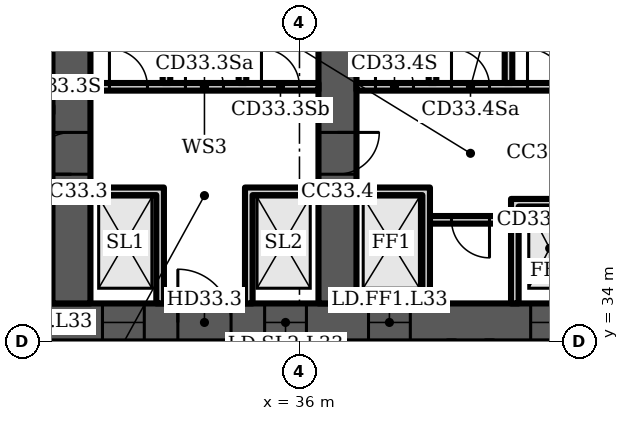
"""IFC4 building model, lengths in metres.
Left out: names, types, materials, properties, quantities, classifications, styles, units other than length and angle.
Written with IfcOpenShell. Run it as: python <this file> out.ifc"""

import sys

from ifc_helpers import new_model, si_unit, direction, frame, frame_2d, origin, place, context, subcontext, project, spatial, polyline, rectangle, outline, extrude, element, fill, save


model = new_model("IFC4")
c1 = context("Model", 3, precision=1e-05, world=origin(), true_north=direction((0.0, 1.0)))
c2 = subcontext(c1, "Body", "Model", "MODEL_VIEW")
j1 = project(units=[si_unit("LENGTHUNIT", "METRE"), si_unit("PLANEANGLEUNIT", "RADIAN")], contexts=[c1])
p1 = place(None, origin())
s1 = spatial("IfcSite", under=j1, at=p1, CompositionType="ELEMENT")
p2 = place(p1, origin())
s2 = spatial("IfcBuilding", under=s1, at=p2, CompositionType="ELEMENT")
p3 = place(p2, frame((0.0, 0.0, 139.9)))
s3 = spatial("IfcBuildingStorey", under=s2, at=p3, CompositionType="ELEMENT", Elevation=139.9)
p4 = place(p3, frame((16.0, 34.5, 0.0), z_axis=(0.0, 0.0, 1.0), x_axis=(1.0, 0.0, 0.0)))
e1 = element("IfcWall", 1, at=p4, inside=s3, PredefinedType="SHEAR", context=c2, shape_type="SweptSolid", body=[
    extrude(rectangle(XDim=49.0, YDim=1.0, at=frame_2d((24.5, 0.0))), origin(), (0.0, 0.0, 1.0), 3.6),
])
p5 = place(p4, frame((1.2, 0.0, 0.0)))
e2 = element("IfcOpeningElement", 2, at=p5, cuts=e1, PredefinedType="OPENING", context=c2, shape_type="SweptSolid", body=[
    extrude(rectangle(XDim=1.1, YDim=2.1, at=frame_2d((0.55, 1.05))), frame((0.0, 0.51, 0.0), z_axis=(0.0, -1.0, 0.0), x_axis=(1.0, 0.0, 0.0)), (0.0, 0.0, 1.0), 1.02),
])
p6 = place(p4, frame((5.083, 0.0, 0.0)))
e3 = element("IfcOpeningElement", 3, at=p6, cuts=e1, PredefinedType="OPENING", context=c2, shape_type="SweptSolid", body=[
    extrude(rectangle(XDim=1.1, YDim=2.1, at=frame_2d((0.55, 1.05))), frame((0.0, 0.51, 0.0), z_axis=(0.0, -1.0, 0.0), x_axis=(1.0, 0.0, 0.0)), (0.0, 0.0, 1.0), 1.02),
])
p7 = place(p4, frame((2.933, 0.0, 0.0)))
e4 = element("IfcOpeningElement", 4, at=p7, cuts=e1, PredefinedType="OPENING", context=c2, shape_type="SweptSolid", body=[
    extrude(rectangle(XDim=1.4, YDim=2.1, at=frame_2d((0.7, 1.05))), frame((0.0, 0.51, 0.0), z_axis=(0.0, -1.0, 0.0), x_axis=(1.0, 0.0, 0.0)), (0.0, 0.0, 1.0), 1.02),
])
p8 = place(p4, frame((7.65, 0.0, 0.0)))
e5 = element("IfcOpeningElement", 5, at=p8, cuts=e1, PredefinedType="OPENING", context=c2, shape_type="SweptSolid", body=[
    extrude(rectangle(XDim=1.2, YDim=2.1, at=frame_2d((0.6, 1.05))), frame((0.0, 0.51, 0.0), z_axis=(0.0, -1.0, 0.0), x_axis=(1.0, 0.0, 0.0)), (0.0, 0.0, 1.0), 1.02),
])
p9 = place(p4, frame((14.817, 0.0, 0.0)))
e6 = element("IfcOpeningElement", 6, at=p9, cuts=e1, PredefinedType="OPENING", context=c2, shape_type="SweptSolid", body=[
    extrude(rectangle(XDim=1.1, YDim=2.1, at=frame_2d((0.55, 1.05))), frame((0.0, 0.51, 0.0), z_axis=(0.0, -1.0, 0.0), x_axis=(1.0, 0.0, 0.0)), (0.0, 0.0, 1.0), 1.02),
])
p10 = place(p4, frame((19.083, 0.0, 0.0)))
e7 = element("IfcOpeningElement", 7, at=p10, cuts=e1, PredefinedType="OPENING", context=c2, shape_type="SweptSolid", body=[
    extrude(rectangle(XDim=1.1, YDim=2.1, at=frame_2d((0.55, 1.05))), frame((0.0, 0.51, 0.0), z_axis=(0.0, -1.0, 0.0), x_axis=(1.0, 0.0, 0.0)), (0.0, 0.0, 1.0), 1.02),
])
p11 = place(p4, frame((16.8, 0.0, 0.0)))
e8 = element("IfcOpeningElement", 8, at=p11, cuts=e1, PredefinedType="OPENING", context=c2, shape_type="SweptSolid", body=[
    extrude(rectangle(XDim=1.4, YDim=2.1, at=frame_2d((0.7, 1.05))), frame((0.0, 0.51, 0.0), z_axis=(0.0, -1.0, 0.0), x_axis=(1.0, 0.0, 0.0)), (0.0, 0.0, 1.0), 1.02),
])
p12 = place(p4, frame((21.817, 0.0, 0.0)))
e9 = element("IfcOpeningElement", 9, at=p12, cuts=e1, PredefinedType="OPENING", context=c2, shape_type="SweptSolid", body=[
    extrude(rectangle(XDim=1.1, YDim=2.1, at=frame_2d((0.55, 1.05))), frame((0.0, 0.51, 0.0), z_axis=(0.0, -1.0, 0.0), x_axis=(1.0, 0.0, 0.0)), (0.0, 0.0, 1.0), 1.02),
])
p13 = place(p4, frame((26.083, 0.0, 0.0)))
e10 = element("IfcOpeningElement", 10, at=p13, cuts=e1, PredefinedType="OPENING", context=c2, shape_type="SweptSolid", body=[
    extrude(rectangle(XDim=1.1, YDim=2.1, at=frame_2d((0.55, 1.05))), frame((0.0, 0.51, 0.0), z_axis=(0.0, -1.0, 0.0), x_axis=(1.0, 0.0, 0.0)), (0.0, 0.0, 1.0), 1.02),
])
p14 = place(p4, frame((33.15, 0.0, 0.0)))
e11 = element("IfcOpeningElement", 11, at=p14, cuts=e1, PredefinedType="OPENING", context=c2, shape_type="SweptSolid", body=[
    extrude(rectangle(XDim=1.2, YDim=2.1, at=frame_2d((0.6, 1.05))), frame((0.0, 0.51, 0.0), z_axis=(0.0, -1.0, 0.0), x_axis=(1.0, 0.0, 0.0)), (0.0, 0.0, 1.0), 1.02),
])
p15 = place(p4, frame((37.8, 0.0, 0.0)))
e12 = element("IfcOpeningElement", 12, at=p15, cuts=e1, PredefinedType="OPENING", context=c2, shape_type="SweptSolid", body=[
    extrude(rectangle(XDim=1.4, YDim=2.1, at=frame_2d((0.7, 1.05))), frame((0.0, 0.51, 0.0), z_axis=(0.0, -1.0, 0.0), x_axis=(1.0, 0.0, 0.0)), (0.0, 0.0, 1.0), 1.02),
])
p16 = place(p4, frame((42.817, 0.0, 0.0)))
e13 = element("IfcOpeningElement", 13, at=p16, cuts=e1, PredefinedType="OPENING", context=c2, shape_type="SweptSolid", body=[
    extrude(rectangle(XDim=1.1, YDim=2.1, at=frame_2d((0.55, 1.05))), frame((0.0, 0.51, 0.0), z_axis=(0.0, -1.0, 0.0), x_axis=(1.0, 0.0, 0.0)), (0.0, 0.0, 1.0), 1.02),
])
p17 = place(p4, frame((46.7, 0.0, 0.0)))
e14 = element("IfcOpeningElement", 14, at=p17, cuts=e1, PredefinedType="OPENING", context=c2, shape_type="SweptSolid", body=[
    extrude(rectangle(XDim=1.1, YDim=2.1, at=frame_2d((0.55, 1.05))), frame((0.0, 0.51, 0.0), z_axis=(0.0, -1.0, 0.0), x_axis=(1.0, 0.0, 0.0)), (0.0, 0.0, 1.0), 1.02),
])
p18 = place(p4, frame((44.667, 0.0, 0.0)))
e15 = element("IfcOpeningElement", 15, at=p18, cuts=e1, PredefinedType="OPENING", context=c2, shape_type="SweptSolid", body=[
    extrude(rectangle(XDim=1.4, YDim=2.1, at=frame_2d((0.7, 1.05))), frame((0.0, 0.51, 0.0), z_axis=(0.0, -1.0, 0.0), x_axis=(1.0, 0.0, 0.0)), (0.0, 0.0, 1.0), 1.02),
])
p19 = place(p3, frame((30.0, 35.0, 0.0), z_axis=(0.0, 0.0, 1.0), x_axis=(0.0, 1.0, 0.0)))
e16 = element("IfcWall", 16, at=p19, inside=s3, PredefinedType="SHEAR", context=c2, shape_type="SweptSolid", body=[
    extrude(rectangle(XDim=13.965, YDim=1.0, at=frame_2d((6.982, 0.0))), origin(), (0.0, 0.0, 1.0), 3.6),
])
p20 = place(p19, frame((3.4, 0.0, 0.0)))
e17 = element("IfcOpeningElement", 17, at=p20, cuts=e16, PredefinedType="OPENING", context=c2, shape_type="SweptSolid", body=[
    extrude(rectangle(XDim=1.1, YDim=2.1, at=frame_2d((0.55, 1.05))), frame((0.0, 0.51, 0.0), z_axis=(0.0, -1.0, 0.0), x_axis=(1.0, 0.0, 0.0)), (0.0, 0.0, 1.0), 1.02),
])
p21 = place(p3, frame((37.0, 35.0, 0.0), z_axis=(0.0, 0.0, 1.0), x_axis=(0.0, 1.0, 0.0)))
e18 = element("IfcWall", 18, at=p21, inside=s3, PredefinedType="SHEAR", context=c2, shape_type="SweptSolid", body=[
    extrude(rectangle(XDim=14.577, YDim=1.0, at=frame_2d((7.289, 0.0))), origin(), (0.0, 0.0, 1.0), 3.6),
])
p22 = place(p21, frame((3.4, 0.0, 0.0)))
e19 = element("IfcOpeningElement", 19, at=p22, cuts=e18, PredefinedType="OPENING", context=c2, shape_type="SweptSolid", body=[
    extrude(rectangle(XDim=1.1, YDim=2.1, at=frame_2d((0.55, 1.05))), frame((0.0, 0.51, 0.0), z_axis=(0.0, -1.0, 0.0), x_axis=(1.0, 0.0, 0.0)), (0.0, 0.0, 1.0), 1.02),
])
p23 = place(p21, frame((9.8, 0.0, 0.0)))
e20 = element("IfcOpeningElement", 20, at=p23, cuts=e18, PredefinedType="OPENING", context=c2, shape_type="SweptSolid", body=[
    extrude(rectangle(XDim=1.0, YDim=2.1, at=frame_2d((0.5, 1.05))), frame((0.0, 0.51, 0.0), z_axis=(0.0, -1.0, 0.0), x_axis=(1.0, 0.0, 0.0)), (0.0, 0.0, 1.0), 1.02),
])
p24 = place(p3, frame((30.5, 40.7, 0.0), z_axis=(0.0, 0.0, 1.0), x_axis=(1.0, 0.0, 0.0)))
e21 = element("IfcWall", 21, at=p24, inside=s3, PredefinedType="PARTITIONING", context=c2, shape_type="SweptSolid", body=[
    extrude(rectangle(XDim=6.0, YDim=0.2, at=frame_2d((3.0, 0.0))), origin(), (0.0, 0.0, 1.0), 3.2),
])
p25 = place(p24, frame((0.5, 0.0, 0.0)))
e22 = element("IfcOpeningElement", 22, at=p25, cuts=e21, PredefinedType="OPENING", context=c2, shape_type="SweptSolid", body=[
    extrude(rectangle(XDim=1.0, YDim=2.1, at=frame_2d((0.5, 1.05))), frame((0.0, 0.11, 0.0), z_axis=(0.0, -1.0, 0.0), x_axis=(1.0, 0.0, 0.0)), (0.0, 0.0, 1.0), 0.22),
])
p26 = place(p24, frame((2.5, 0.0, 0.0)))
e23 = element("IfcOpeningElement", 23, at=p26, cuts=e21, PredefinedType="OPENING", context=c2, shape_type="SweptSolid", body=[
    extrude(rectangle(XDim=1.0, YDim=2.1, at=frame_2d((0.5, 1.05))), frame((0.0, 0.11, 0.0), z_axis=(0.0, -1.0, 0.0), x_axis=(1.0, 0.0, 0.0)), (0.0, 0.0, 1.0), 0.22),
])
p27 = place(p24, frame((4.5, 0.0, 0.0)))
e24 = element("IfcOpeningElement", 24, at=p27, cuts=e21, PredefinedType="OPENING", context=c2, shape_type="SweptSolid", body=[
    extrude(rectangle(XDim=1.0, YDim=2.1, at=frame_2d((0.5, 1.05))), frame((0.0, 0.11, 0.0), z_axis=(0.0, -1.0, 0.0), x_axis=(1.0, 0.0, 0.0)), (0.0, 0.0, 1.0), 0.22),
])
p28 = place(p3, origin())
e25 = element("IfcWall", 25, at=p28, inside=s3, PredefinedType="PARTITIONING", context=c2, shape_type="SweptSolid", body=[
    extrude(outline(polyline([(32.233, 37.85), (30.5, 37.85), (30.5, 38.05), (32.233, 38.05), (32.433, 38.05), (32.433, 35.0), (32.233, 35.0), (32.233, 37.85)])), origin(), (0.0, 0.0, 1.0), 3.2),
])
p29 = place(p3, origin())
e26 = element("IfcWall", 26, at=p29, inside=s3, PredefinedType="PARTITIONING", context=c2, shape_type="SweptSolid", body=[
    extrude(outline(polyline([(34.567, 38.05), (34.767, 38.05), (36.5, 38.05), (36.5, 37.85), (34.767, 37.85), (34.767, 35.0), (34.567, 35.0), (34.567, 38.05)])), origin(), (0.0, 0.0, 1.0), 3.2),
])
for number, where, z_axis, x_axis in (
    (27, (32.5, 40.8, 0.0), (0.0, 0.0, 1.0), (0.0, 1.0, 0.0)),
    (28, (34.5, 40.8, 0.0), (0.0, 0.0, 1.0), (0.0, 1.0, 0.0)),
):
    element("IfcWall", number, at=place(p3, frame(where, z_axis=z_axis, x_axis=x_axis)), inside=s3, PredefinedType="PARTITIONING", context=c2, shape_type="SweptSolid", body=[
        extrude(rectangle(XDim=8.232, YDim=0.2, at=frame_2d((4.116, 0.0))), origin(), (0.0, 0.0, 1.0), 3.2),
    ])
p30 = place(p3, frame((39.433, 37.2, 0.0), z_axis=(0.0, 0.0, 1.0), x_axis=(1.0, 0.0, 0.0)))
e29 = element("IfcWall", 29, at=p30, inside=s3, PredefinedType="PARTITIONING", context=c2, shape_type="SweptSolid", body=[
    extrude(rectangle(XDim=2.133, YDim=0.2, at=frame_2d((1.067, 0.0))), origin(), (0.0, 0.0, 1.0), 3.2),
])
p31 = place(p30, frame((0.567, 0.0, 0.0)))
e30 = element("IfcOpeningElement", 30, at=p31, cuts=e29, PredefinedType="OPENING", context=c2, shape_type="SweptSolid", body=[
    extrude(rectangle(XDim=1.0, YDim=2.1, at=frame_2d((0.5, 1.05))), frame((0.0, 0.11, 0.0), z_axis=(0.0, -1.0, 0.0), x_axis=(1.0, 0.0, 0.0)), (0.0, 0.0, 1.0), 0.22),
])
p32 = place(p3, frame((37.5, 40.7, 0.0), z_axis=(0.0, 0.0, 1.0), x_axis=(1.0, 0.0, 0.0)))
e31 = element("IfcWall", 31, at=p32, inside=s3, PredefinedType="PARTITIONING", context=c2, shape_type="SweptSolid", body=[
    extrude(rectangle(XDim=6.0, YDim=0.2, at=frame_2d((3.0, 0.0))), origin(), (0.0, 0.0, 1.0), 3.2),
])
p33 = place(p32, frame((0.5, 0.0, 0.0)))
e32 = element("IfcOpeningElement", 32, at=p33, cuts=e31, PredefinedType="OPENING", context=c2, shape_type="SweptSolid", body=[
    extrude(rectangle(XDim=1.0, YDim=2.1, at=frame_2d((0.5, 1.05))), frame((0.0, 0.11, 0.0), z_axis=(0.0, -1.0, 0.0), x_axis=(1.0, 0.0, 0.0)), (0.0, 0.0, 1.0), 0.22),
])
p34 = place(p32, frame((2.5, 0.0, 0.0)))
e33 = element("IfcOpeningElement", 33, at=p34, cuts=e31, PredefinedType="OPENING", context=c2, shape_type="SweptSolid", body=[
    extrude(rectangle(XDim=1.0, YDim=2.1, at=frame_2d((0.5, 1.05))), frame((0.0, 0.11, 0.0), z_axis=(0.0, -1.0, 0.0), x_axis=(1.0, 0.0, 0.0)), (0.0, 0.0, 1.0), 0.22),
])
p35 = place(p32, frame((4.5, 0.0, 0.0)))
e34 = element("IfcOpeningElement", 34, at=p35, cuts=e31, PredefinedType="OPENING", context=c2, shape_type="SweptSolid", body=[
    extrude(rectangle(XDim=1.0, YDim=2.1, at=frame_2d((0.5, 1.05))), frame((0.0, 0.11, 0.0), z_axis=(0.0, -1.0, 0.0), x_axis=(1.0, 0.0, 0.0)), (0.0, 0.0, 1.0), 0.22),
])
p36 = place(p3, origin())
e35 = element("IfcWall", 35, at=p36, inside=s3, PredefinedType="PARTITIONING", context=c2, shape_type="SweptSolid", body=[
    extrude(outline(polyline([(41.567, 37.75), (41.767, 37.75), (43.5, 37.75), (43.5, 37.55), (41.767, 37.55), (41.767, 35.0), (41.567, 35.0), (41.567, 37.75)])), origin(), (0.0, 0.0, 1.0), 3.2),
])
p37 = place(p3, origin())
e36 = element("IfcWall", 36, at=p37, inside=s3, PredefinedType="PARTITIONING", context=c2, shape_type="SweptSolid", body=[
    extrude(outline(polyline([(39.233, 37.85), (37.5, 37.85), (37.5, 38.05), (39.233, 38.05), (39.433, 38.05), (39.433, 35.0), (39.233, 35.0), (39.233, 37.85)])), origin(), (0.0, 0.0, 1.0), 3.2),
])
for number, where, z_axis, x_axis in (
    (37, (39.5, 40.8, 0.0), (0.0, 0.0, 1.0), (0.0, 1.0, 0.0)),
    (38, (41.5, 40.8, 0.0), (0.0, 0.0, 1.0), (0.0, 1.0, 0.0)),
):
    element("IfcWall", number, at=place(p3, frame(where, z_axis=z_axis, x_axis=x_axis)), inside=s3, PredefinedType="PARTITIONING", context=c2, shape_type="SweptSolid", body=[
        extrude(rectangle(XDim=8.844, YDim=0.2, at=frame_2d((4.422, 0.0))), origin(), (0.0, 0.0, 1.0), 3.2),
    ])
p38 = place(p9, origin())
e39 = element("IfcDoor", 39, at=p38, inside=s3, OperationType="DOUBLE_DOOR_SLIDING", PredefinedType="DOOR", context=c2, shape_type="SweptSolid", body=[
    extrude(rectangle(XDim=1.1, YDim=2.1, at=frame_2d((0.55, 1.05))), frame((0.0, 0.025, 0.0), z_axis=(0.0, -1.0, 0.0), x_axis=(1.0, 0.0, 0.0)), (0.0, 0.0, 1.0), 0.05),
])
fill(e6, e39)
p39 = place(p10, origin())
e40 = element("IfcDoor", 40, at=p39, inside=s3, OperationType="DOUBLE_DOOR_SLIDING", PredefinedType="DOOR", context=c2, shape_type="SweptSolid", body=[
    extrude(rectangle(XDim=1.1, YDim=2.1, at=frame_2d((0.55, 1.05))), frame((0.0, 0.025, 0.0), z_axis=(0.0, -1.0, 0.0), x_axis=(1.0, 0.0, 0.0)), (0.0, 0.0, 1.0), 0.05),
])
fill(e7, e40)
p40 = place(p11, origin())
e41 = element("IfcDoor", 41, at=p40, inside=s3, OperationType="DOUBLE_DOOR_SINGLE_SWING", PredefinedType="DOOR", context=c2, shape_type="SweptSolid", body=[
    extrude(rectangle(XDim=1.4, YDim=2.1, at=frame_2d((0.7, 1.05))), frame((0.0, 0.025, 0.0), z_axis=(0.0, -1.0, 0.0), x_axis=(1.0, 0.0, 0.0)), (0.0, 0.0, 1.0), 0.05),
])
fill(e8, e41)
p41 = place(p25, origin())
e42 = element("IfcDoor", 42, at=p41, inside=s3, OperationType="SINGLE_SWING_LEFT", PredefinedType="DOOR", context=c2, shape_type="SweptSolid", body=[
    extrude(rectangle(XDim=1.0, YDim=2.1, at=frame_2d((0.5, 1.05))), frame((0.0, 0.025, 0.0), z_axis=(0.0, -1.0, 0.0), x_axis=(1.0, 0.0, 0.0)), (0.0, 0.0, 1.0), 0.05),
])
fill(e22, e42)
p42 = place(p26, origin())
e43 = element("IfcDoor", 43, at=p42, inside=s3, OperationType="SINGLE_SWING_LEFT", PredefinedType="DOOR", context=c2, shape_type="SweptSolid", body=[
    extrude(rectangle(XDim=1.0, YDim=2.1, at=frame_2d((0.5, 1.05))), frame((0.0, 0.025, 0.0), z_axis=(0.0, -1.0, 0.0), x_axis=(1.0, 0.0, 0.0)), (0.0, 0.0, 1.0), 0.05),
])
fill(e23, e43)
p43 = place(p27, origin())
e44 = element("IfcDoor", 44, at=p43, inside=s3, OperationType="SINGLE_SWING_LEFT", PredefinedType="DOOR", context=c2, shape_type="SweptSolid", body=[
    extrude(rectangle(XDim=1.0, YDim=2.1, at=frame_2d((0.5, 1.05))), frame((0.0, 0.025, 0.0), z_axis=(0.0, -1.0, 0.0), x_axis=(1.0, 0.0, 0.0)), (0.0, 0.0, 1.0), 0.05),
])
fill(e24, e44)
p44 = place(p31, origin())
e45 = element("IfcDoor", 45, at=p44, inside=s3, OperationType="SINGLE_SWING_RIGHT", PredefinedType="DOOR", context=c2, shape_type="SweptSolid", body=[
    extrude(rectangle(XDim=1.0, YDim=2.1, at=frame_2d((0.5, 1.05))), frame((0.0, 0.025, 0.0), z_axis=(0.0, -1.0, 0.0), x_axis=(1.0, 0.0, 0.0)), (0.0, 0.0, 1.0), 0.05),
])
fill(e30, e45)
p45 = place(p12, origin())
e46 = element("IfcDoor", 46, at=p45, inside=s3, OperationType="DOUBLE_DOOR_SLIDING", PredefinedType="DOOR", context=c2, shape_type="SweptSolid", body=[
    extrude(rectangle(XDim=1.1, YDim=2.1, at=frame_2d((0.55, 1.05))), frame((0.0, 0.025, 0.0), z_axis=(0.0, -1.0, 0.0), x_axis=(1.0, 0.0, 0.0)), (0.0, 0.0, 1.0), 0.05),
])
fill(e9, e46)
p46 = place(p13, origin())
e47 = element("IfcDoor", 47, at=p46, inside=s3, OperationType="DOUBLE_DOOR_SLIDING", PredefinedType="DOOR", context=c2, shape_type="SweptSolid", body=[
    extrude(rectangle(XDim=1.1, YDim=2.1, at=frame_2d((0.55, 1.05))), frame((0.0, 0.025, 0.0), z_axis=(0.0, -1.0, 0.0), x_axis=(1.0, 0.0, 0.0)), (0.0, 0.0, 1.0), 0.05),
])
fill(e10, e47)
p47 = place(p33, origin())
e48 = element("IfcDoor", 48, at=p47, inside=s3, OperationType="SINGLE_SWING_LEFT", PredefinedType="DOOR", context=c2, shape_type="SweptSolid", body=[
    extrude(rectangle(XDim=1.0, YDim=2.1, at=frame_2d((0.5, 1.05))), frame((0.0, 0.025, 0.0), z_axis=(0.0, -1.0, 0.0), x_axis=(1.0, 0.0, 0.0)), (0.0, 0.0, 1.0), 0.05),
])
fill(e32, e48)
p48 = place(p34, origin())
e49 = element("IfcDoor", 49, at=p48, inside=s3, OperationType="SINGLE_SWING_LEFT", PredefinedType="DOOR", context=c2, shape_type="SweptSolid", body=[
    extrude(rectangle(XDim=1.0, YDim=2.1, at=frame_2d((0.5, 1.05))), frame((0.0, 0.025, 0.0), z_axis=(0.0, -1.0, 0.0), x_axis=(1.0, 0.0, 0.0)), (0.0, 0.0, 1.0), 0.05),
])
fill(e33, e49)
p49 = place(p35, origin())
e50 = element("IfcDoor", 50, at=p49, inside=s3, OperationType="SINGLE_SWING_LEFT", PredefinedType="DOOR", context=c2, shape_type="SweptSolid", body=[
    extrude(rectangle(XDim=1.0, YDim=2.1, at=frame_2d((0.5, 1.05))), frame((0.0, 0.025, 0.0), z_axis=(0.0, -1.0, 0.0), x_axis=(1.0, 0.0, 0.0)), (0.0, 0.0, 1.0), 0.05),
])
fill(e34, e50)
p50 = place(p20, origin())
e51 = element("IfcDoor", 51, at=p50, inside=s3, OperationType="SINGLE_SWING_LEFT", PredefinedType="DOOR", context=c2, shape_type="SweptSolid", body=[
    extrude(rectangle(XDim=1.1, YDim=2.1, at=frame_2d((0.55, 1.05))), frame((0.0, 0.025, 0.0), z_axis=(0.0, -1.0, 0.0), x_axis=(1.0, 0.0, 0.0)), (0.0, 0.0, 1.0), 0.05),
])
fill(e17, e51)
p51 = place(p22, origin())
e52 = element("IfcDoor", 52, at=p51, inside=s3, OperationType="SINGLE_SWING_RIGHT", PredefinedType="DOOR", context=c2, shape_type="SweptSolid", body=[
    extrude(rectangle(XDim=1.1, YDim=2.1, at=frame_2d((0.55, 1.05))), frame((0.0, 0.025, 0.0), z_axis=(0.0, -1.0, 0.0), x_axis=(1.0, 0.0, 0.0)), (0.0, 0.0, 1.0), 0.05),
])
fill(e19, e52)
save(model, sys.argv[1])
